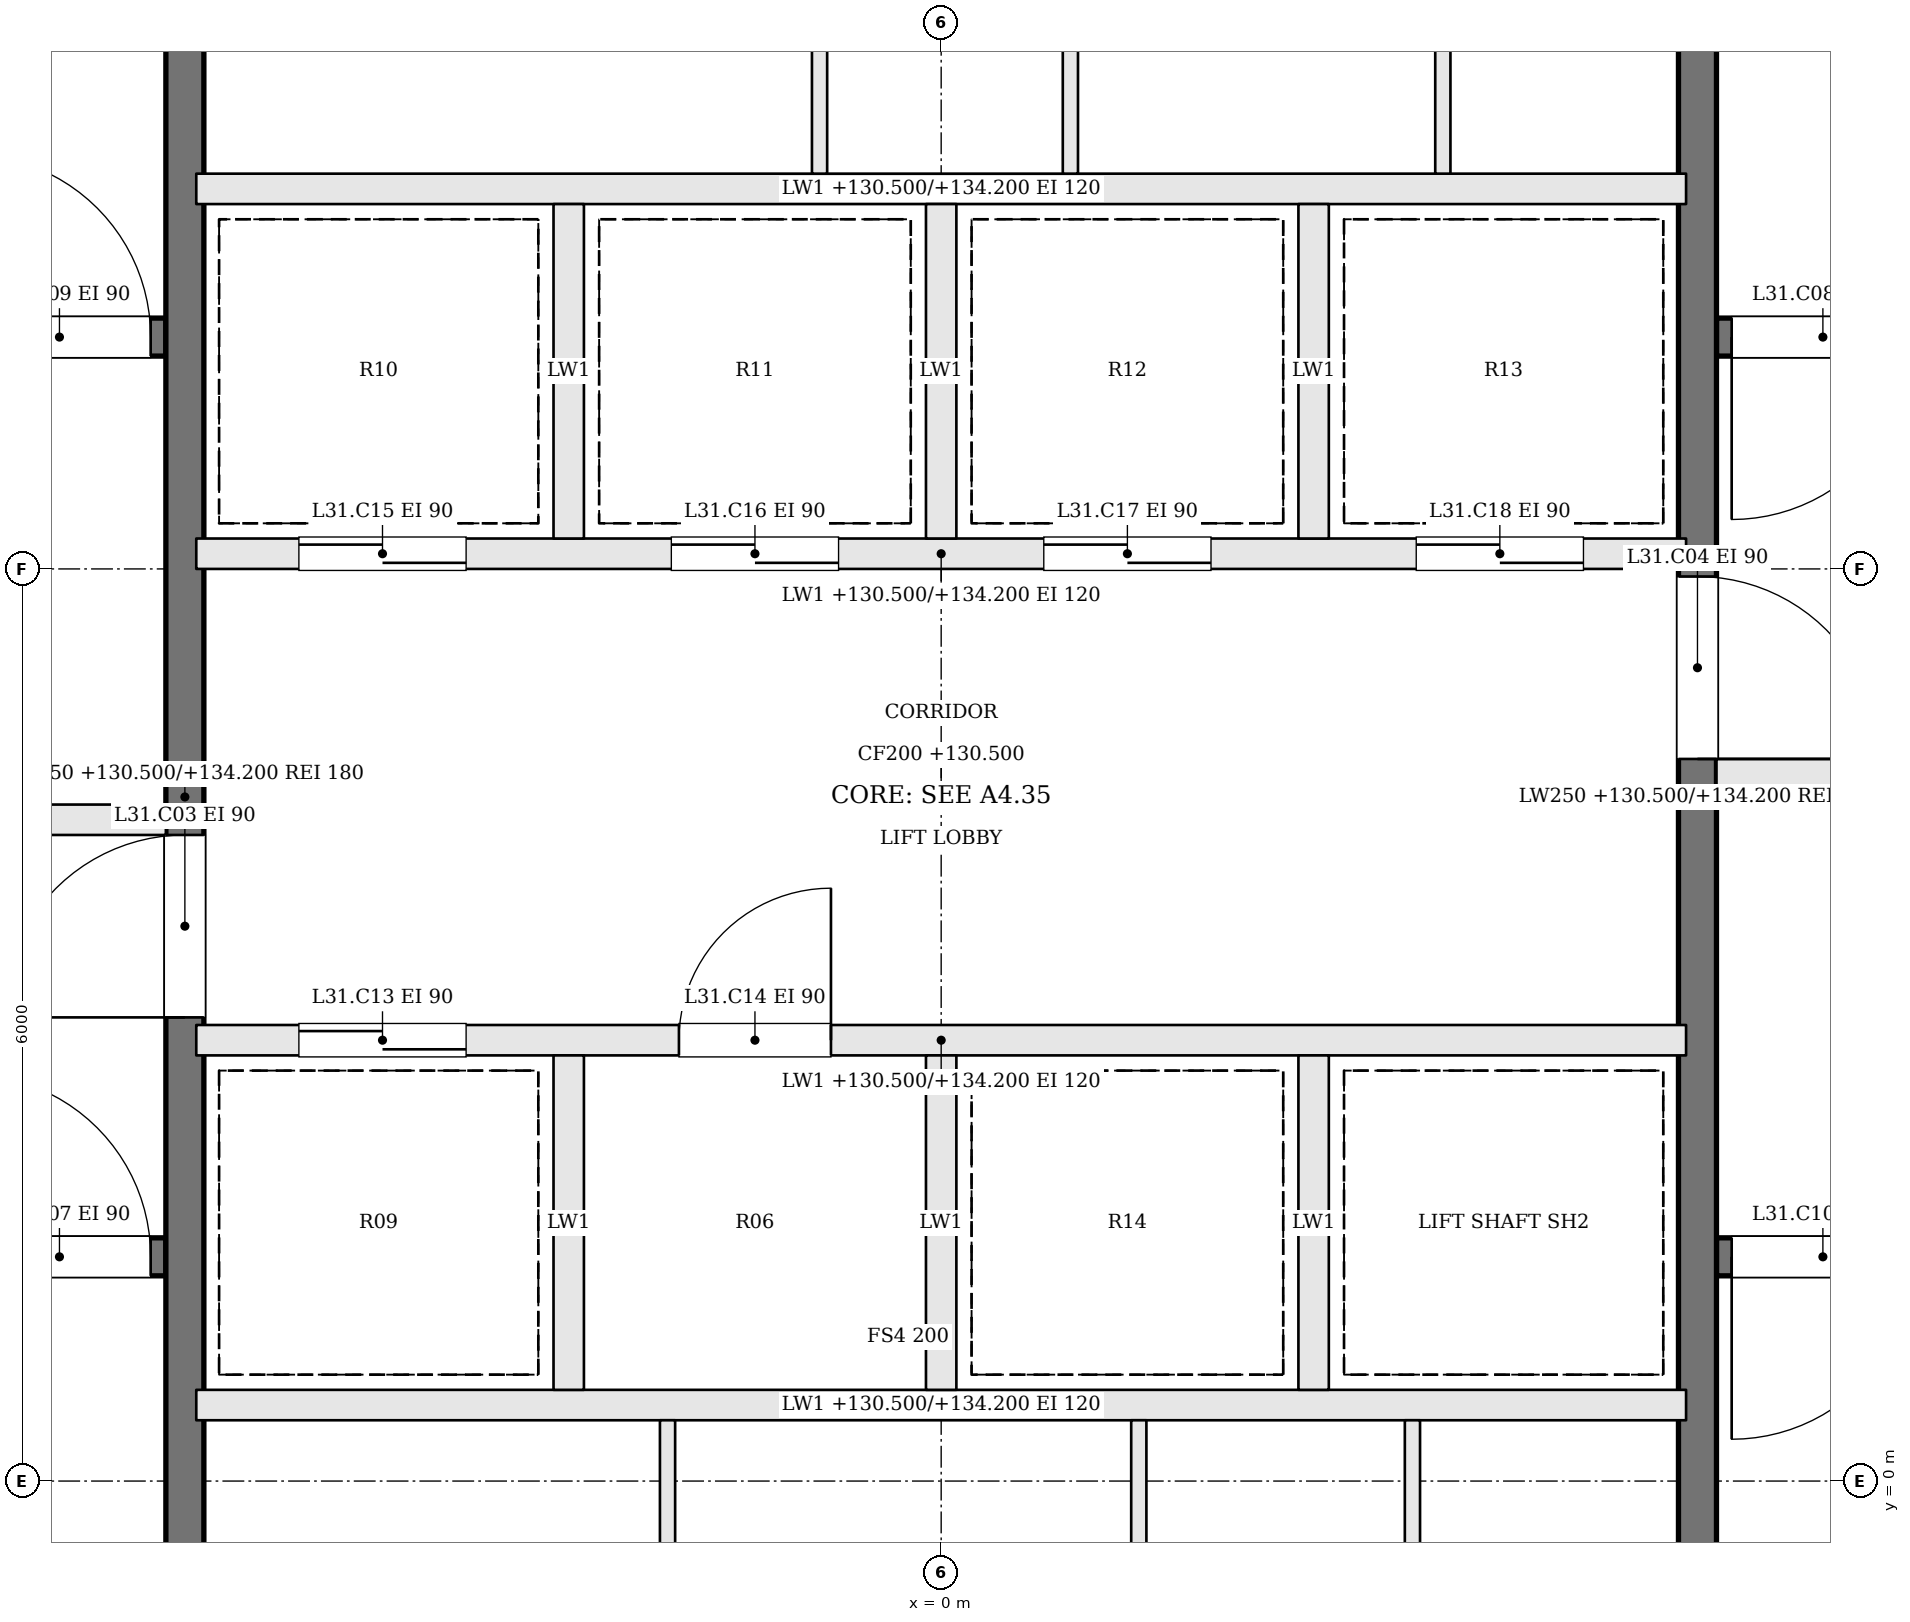
"""IFC4 building model, lengths in metres.
Left out: names, types, materials, properties, quantities, classifications, styles, units other than length and angle.
Written with IfcOpenShell. Run it as: python <this file> out.ifc"""

import sys

from ifc_helpers import new_model, si_unit, direction, frame, frame_2d, origin, place, context, subcontext, project, spatial, rectangle, extrude, element, fill, save


model = new_model("IFC4")
c1 = context("Model", 3, precision=1e-05, world=origin(), true_north=direction((0.0, 1.0)))
c2 = subcontext(c1, "Body", "Model", "MODEL_VIEW")
j1 = project(units=[si_unit("LENGTHUNIT", "METRE"), si_unit("PLANEANGLEUNIT", "RADIAN")], contexts=[c1])
p1 = place(None, origin())
s1 = spatial("IfcSite", under=j1, at=p1, CompositionType="ELEMENT")
p2 = place(p1, origin())
s2 = spatial("IfcBuilding", under=s1, at=p2, CompositionType="ELEMENT")
p3 = place(p2, frame((0.0, 0.0, 130.5)))
s3 = spatial("IfcBuildingStorey", under=s2, at=p3, CompositionType="ELEMENT", Elevation=130.5)
p4 = place(p3, frame((-11.9, 1.475, 0.0), z_axis=(0.0, 0.0, 1.0), x_axis=(1.0, 0.0, 0.0)))
e1 = element("IfcWall", 1, at=p4, inside=s3, PredefinedType="SOLIDWALL", context=c2, shape_type="SweptSolid", body=[
    extrude(rectangle(XDim=6.8, YDim=0.25, at=frame_2d((3.4, 0.0))), origin(), (0.0, 0.0, 1.0), 3.7),
])
p5 = place(p4, frame((5.5, 0.0, 0.0)))
e2 = element("IfcOpeningElement", 2, at=p5, cuts=e1, PredefinedType="OPENING", context=c2, shape_type="SweptSolid", body=[
    extrude(rectangle(XDim=1.2, YDim=2.1, at=frame_2d((0.6, 1.05))), frame((0.0, 0.135, 0.0), z_axis=(0.0, -1.0, 0.0), x_axis=(1.0, 0.0, 0.0)), (0.0, 0.0, 1.0), 0.27),
])
p6 = place(p3, frame((11.9, 7.525, 0.0), z_axis=(0.0, 0.0, 1.0), x_axis=(-1.0, 0.0, 0.0)))
e3 = element("IfcWall", 3, at=p6, inside=s3, PredefinedType="SOLIDWALL", context=c2, shape_type="SweptSolid", body=[
    extrude(rectangle(XDim=6.8, YDim=0.25, at=frame_2d((3.4, 0.0))), origin(), (0.0, 0.0, 1.0), 3.7),
])
p7 = place(p6, frame((5.5, 0.0, 0.0)))
e4 = element("IfcOpeningElement", 4, at=p7, cuts=e3, PredefinedType="OPENING", context=c2, shape_type="SweptSolid", body=[
    extrude(rectangle(XDim=1.2, YDim=2.1, at=frame_2d((0.6, 1.05))), frame((0.0, 0.135, 0.0), z_axis=(0.0, -1.0, 0.0), x_axis=(1.0, 0.0, 0.0)), (0.0, 0.0, 1.0), 0.27),
])
p8 = place(p3, frame((-11.9, 4.35, 0.0), z_axis=(0.0, 0.0, 1.0), x_axis=(1.0, 0.0, 0.0)))
e5 = element("IfcWall", 5, at=p8, inside=s3, PredefinedType="SOLIDWALL", context=c2, shape_type="SweptSolid", body=[
    extrude(rectangle(XDim=6.8, YDim=0.2, at=frame_2d((3.4, 0.0))), origin(), (0.0, 0.0, 1.0), 3.7),
])
p9 = place(p8, frame((4.1, 0.0, 0.0)))
e6 = element("IfcOpeningElement", 6, at=p9, cuts=e5, PredefinedType="OPENING", context=c2, shape_type="SweptSolid", body=[
    extrude(rectangle(XDim=1.2, YDim=2.1, at=frame_2d((0.6, 1.05))), frame((0.0, 0.11, 0.0), z_axis=(0.0, -1.0, 0.0), x_axis=(1.0, 0.0, 0.0)), (0.0, 0.0, 1.0), 0.22),
])
p10 = place(p8, frame((0.8, 0.0, 0.0)))
e7 = element("IfcOpeningElement", 7, at=p10, cuts=e5, PredefinedType="OPENING", context=c2, shape_type="SweptSolid", body=[
    extrude(rectangle(XDim=1.2, YDim=2.1, at=frame_2d((0.6, 1.05))), frame((0.0, 0.11, 0.0), z_axis=(0.0, -1.0, 0.0), x_axis=(1.0, 0.0, 0.0)), (0.0, 0.0, 1.0), 0.22),
])
p11 = place(p3, frame((11.9, 4.65, 0.0), z_axis=(0.0, 0.0, 1.0), x_axis=(-1.0, 0.0, 0.0)))
e8 = element("IfcWall", 8, at=p11, inside=s3, PredefinedType="SOLIDWALL", context=c2, shape_type="SweptSolid", body=[
    extrude(rectangle(XDim=6.8, YDim=0.2, at=frame_2d((3.4, 0.0))), origin(), (0.0, 0.0, 1.0), 3.7),
])
p12 = place(p11, frame((4.1, 0.0, 0.0)))
e9 = element("IfcOpeningElement", 9, at=p12, cuts=e8, PredefinedType="OPENING", context=c2, shape_type="SweptSolid", body=[
    extrude(rectangle(XDim=1.2, YDim=2.1, at=frame_2d((0.6, 1.05))), frame((0.0, 0.11, 0.0), z_axis=(0.0, -1.0, 0.0), x_axis=(1.0, 0.0, 0.0)), (0.0, 0.0, 1.0), 0.22),
])
p13 = place(p11, frame((0.8, 0.0, 0.0)))
e10 = element("IfcOpeningElement", 10, at=p13, cuts=e8, PredefinedType="OPENING", context=c2, shape_type="SweptSolid", body=[
    extrude(rectangle(XDim=1.2, YDim=2.1, at=frame_2d((0.6, 1.05))), frame((0.0, 0.11, 0.0), z_axis=(0.0, -1.0, 0.0), x_axis=(1.0, 0.0, 0.0)), (0.0, 0.0, 1.0), 0.22),
])
p14 = place(p3, frame((-11.9, 7.525, 0.0), z_axis=(0.0, 0.0, 1.0), x_axis=(1.0, 0.0, 0.0)))
e11 = element("IfcWall", 11, at=p14, inside=s3, PredefinedType="SOLIDWALL", context=c2, shape_type="SweptSolid", body=[
    extrude(rectangle(XDim=6.8, YDim=0.25, at=frame_2d((3.4, 0.0))), origin(), (0.0, 0.0, 1.0), 3.7),
])
p15 = place(p14, frame((5.5, 0.0, 0.0)))
e12 = element("IfcOpeningElement", 12, at=p15, cuts=e11, PredefinedType="OPENING", context=c2, shape_type="SweptSolid", body=[
    extrude(rectangle(XDim=1.2, YDim=2.1, at=frame_2d((0.6, 1.05))), frame((0.0, 0.135, 0.0), z_axis=(0.0, -1.0, 0.0), x_axis=(1.0, 0.0, 0.0)), (0.0, 0.0, 1.0), 0.27),
])
p16 = place(p3, frame((11.9, 1.475, 0.0), z_axis=(0.0, 0.0, 1.0), x_axis=(-1.0, 0.0, 0.0)))
e13 = element("IfcWall", 13, at=p16, inside=s3, PredefinedType="SOLIDWALL", context=c2, shape_type="SweptSolid", body=[
    extrude(rectangle(XDim=6.8, YDim=0.25, at=frame_2d((3.4, 0.0))), origin(), (0.0, 0.0, 1.0), 3.7),
])
p17 = place(p16, frame((5.5, 0.0, 0.0)))
e14 = element("IfcOpeningElement", 14, at=p17, cuts=e13, PredefinedType="OPENING", context=c2, shape_type="SweptSolid", body=[
    extrude(rectangle(XDim=1.2, YDim=2.1, at=frame_2d((0.6, 1.05))), frame((0.0, 0.135, 0.0), z_axis=(0.0, -1.0, 0.0), x_axis=(1.0, 0.0, 0.0)), (0.0, 0.0, 1.0), 0.27),
])
p18 = place(p3, frame((-4.975, -1.9, 0.0), z_axis=(0.0, 0.0, 1.0), x_axis=(0.0, 1.0, 0.0)))
e15 = element("IfcWall", 15, at=p18, inside=s3, PredefinedType="SOLIDWALL", context=c2, shape_type="SweptSolid", body=[
    extrude(rectangle(XDim=12.8, YDim=0.25, at=frame_2d((6.4, 0.0))), origin(), (0.0, 0.0, 1.0), 3.7),
])
p19 = place(p18, frame((4.95, 0.0, 0.0)))
e16 = element("IfcOpeningElement", 16, at=p19, cuts=e15, PredefinedType="OPENING", context=c2, shape_type="SweptSolid", body=[
    extrude(rectangle(XDim=1.2, YDim=2.1, at=frame_2d((0.6, 1.05))), frame((0.0, 0.135, 0.0), z_axis=(0.0, -1.0, 0.0), x_axis=(1.0, 0.0, 0.0)), (0.0, 0.0, 1.0), 0.27),
])
p20 = place(p3, frame((4.975, 10.9, 0.0), z_axis=(0.0, 0.0, 1.0), x_axis=(0.0, -1.0, 0.0)))
e17 = element("IfcWall", 17, at=p20, inside=s3, PredefinedType="SOLIDWALL", context=c2, shape_type="SweptSolid", body=[
    extrude(rectangle(XDim=12.8, YDim=0.25, at=frame_2d((6.4, 0.0))), origin(), (0.0, 0.0, 1.0), 3.7),
])
p21 = place(p20, frame((4.95, 0.0, 0.0)))
e18 = element("IfcOpeningElement", 18, at=p21, cuts=e17, PredefinedType="OPENING", context=c2, shape_type="SweptSolid", body=[
    extrude(rectangle(XDim=1.2, YDim=2.1, at=frame_2d((0.6, 1.05))), frame((0.0, 0.135, 0.0), z_axis=(0.0, -1.0, 0.0), x_axis=(1.0, 0.0, 0.0)), (0.0, 0.0, 1.0), 0.27),
])
p22 = place(p3, frame((-4.9, 0.5, 0.0), z_axis=(0.0, 0.0, 1.0), x_axis=(1.0, 0.0, 0.0)))
e19 = element("IfcWall", 19, at=p22, inside=s3, PredefinedType="SOLIDWALL", context=c2, shape_type="SweptSolid", body=[
    extrude(rectangle(XDim=9.8, YDim=0.2, at=frame_2d((4.9, 0.0))), origin(), (0.0, 0.0, 1.0), 3.7),
])
p23 = place(p3, frame((-4.9, 2.9, 0.0), z_axis=(0.0, 0.0, 1.0), x_axis=(1.0, 0.0, 0.0)))
e20 = element("IfcWall", 20, at=p23, inside=s3, PredefinedType="SOLIDWALL", context=c2, shape_type="SweptSolid", body=[
    extrude(rectangle(XDim=9.8, YDim=0.2, at=frame_2d((4.9, 0.0))), origin(), (0.0, 0.0, 1.0), 3.7),
])
p24 = place(p23, frame((0.675, 0.0, 0.0)))
e21 = element("IfcOpeningElement", 21, at=p24, cuts=e20, PredefinedType="OPENING", context=c2, shape_type="SweptSolid", body=[
    extrude(rectangle(XDim=1.1, YDim=2.1, at=frame_2d((0.55, 1.05))), frame((0.0, 0.11, 0.0), z_axis=(0.0, -1.0, 0.0), x_axis=(1.0, 0.0, 0.0)), (0.0, 0.0, 1.0), 0.22),
])
p25 = place(p23, frame((3.175, 0.0, 0.0)))
e22 = element("IfcOpeningElement", 22, at=p25, cuts=e20, PredefinedType="OPENING", context=c2, shape_type="SweptSolid", body=[
    extrude(rectangle(XDim=1.0, YDim=2.1, at=frame_2d((0.5, 1.05))), frame((0.0, 0.11, 0.0), z_axis=(0.0, -1.0, 0.0), x_axis=(1.0, 0.0, 0.0)), (0.0, 0.0, 1.0), 0.22),
])
p26 = place(p3, frame((-4.9, 6.1, 0.0), z_axis=(0.0, 0.0, 1.0), x_axis=(1.0, 0.0, 0.0)))
e23 = element("IfcWall", 23, at=p26, inside=s3, PredefinedType="SOLIDWALL", context=c2, shape_type="SweptSolid", body=[
    extrude(rectangle(XDim=9.8, YDim=0.2, at=frame_2d((4.9, 0.0))), origin(), (0.0, 0.0, 1.0), 3.7),
])
p27 = place(p26, frame((0.675, 0.0, 0.0)))
e24 = element("IfcOpeningElement", 24, at=p27, cuts=e23, PredefinedType="OPENING", context=c2, shape_type="SweptSolid", body=[
    extrude(rectangle(XDim=1.1, YDim=2.1, at=frame_2d((0.55, 1.05))), frame((0.0, 0.11, 0.0), z_axis=(0.0, -1.0, 0.0), x_axis=(1.0, 0.0, 0.0)), (0.0, 0.0, 1.0), 0.22),
])
p28 = place(p26, frame((3.125, 0.0, 0.0)))
e25 = element("IfcOpeningElement", 25, at=p28, cuts=e23, PredefinedType="OPENING", context=c2, shape_type="SweptSolid", body=[
    extrude(rectangle(XDim=1.1, YDim=2.1, at=frame_2d((0.55, 1.05))), frame((0.0, 0.11, 0.0), z_axis=(0.0, -1.0, 0.0), x_axis=(1.0, 0.0, 0.0)), (0.0, 0.0, 1.0), 0.22),
])
p29 = place(p26, frame((5.575, 0.0, 0.0)))
e26 = element("IfcOpeningElement", 26, at=p29, cuts=e23, PredefinedType="OPENING", context=c2, shape_type="SweptSolid", body=[
    extrude(rectangle(XDim=1.1, YDim=2.1, at=frame_2d((0.55, 1.05))), frame((0.0, 0.11, 0.0), z_axis=(0.0, -1.0, 0.0), x_axis=(1.0, 0.0, 0.0)), (0.0, 0.0, 1.0), 0.22),
])
p30 = place(p26, frame((8.025, 0.0, 0.0)))
e27 = element("IfcOpeningElement", 27, at=p30, cuts=e23, PredefinedType="OPENING", context=c2, shape_type="SweptSolid", body=[
    extrude(rectangle(XDim=1.1, YDim=2.1, at=frame_2d((0.55, 1.05))), frame((0.0, 0.11, 0.0), z_axis=(0.0, -1.0, 0.0), x_axis=(1.0, 0.0, 0.0)), (0.0, 0.0, 1.0), 0.22),
])
p31 = place(p3, frame((-4.9, 8.5, 0.0), z_axis=(0.0, 0.0, 1.0), x_axis=(1.0, 0.0, 0.0)))
e28 = element("IfcWall", 28, at=p31, inside=s3, PredefinedType="SOLIDWALL", context=c2, shape_type="SweptSolid", body=[
    extrude(rectangle(XDim=9.8, YDim=0.2, at=frame_2d((4.9, 0.0))), origin(), (0.0, 0.0, 1.0), 3.7),
])
for number, where, z_axis, x_axis in (
    (29, (-2.45, 0.6, 0.0), (0.0, 0.0, 1.0), (0.0, 1.0, 0.0)),
    (30, (0.0, 0.6, 0.0), (0.0, 0.0, 1.0), (0.0, 1.0, 0.0)),
    (31, (2.45, 0.6, 0.0), (0.0, 0.0, 1.0), (0.0, 1.0, 0.0)),
    (32, (-2.45, 6.2, 0.0), (0.0, 0.0, 1.0), (0.0, 1.0, 0.0)),
    (33, (0.0, 6.2, 0.0), (0.0, 0.0, 1.0), (0.0, 1.0, 0.0)),
    (34, (2.45, 6.2, 0.0), (0.0, 0.0, 1.0), (0.0, 1.0, 0.0)),
):
    element("IfcWall", number, at=place(p3, frame(where, z_axis=z_axis, x_axis=x_axis)), inside=s3, PredefinedType="SOLIDWALL", context=c2, shape_type="SweptSolid", body=[
        extrude(rectangle(XDim=2.2, YDim=0.2, at=frame_2d((1.1, 0.0))), origin(), (0.0, 0.0, 1.0), 3.7),
    ])
for number, where, z_axis, x_axis in (
    (35, (-1.8, -1.9, 0.0), (0.0, 0.0, 1.0), (0.0, 1.0, 0.0)),
    (36, (1.3, -1.9, 0.0), (0.0, 0.0, 1.0), (0.0, 1.0, 0.0)),
    (37, (3.1, -1.9, 0.0), (0.0, 0.0, 1.0), (0.0, 1.0, 0.0)),
    (38, (-0.8, 8.6, 0.0), (0.0, 0.0, 1.0), (0.0, 1.0, 0.0)),
    (39, (0.85, 8.6, 0.0), (0.0, 0.0, 1.0), (0.0, 1.0, 0.0)),
    (40, (3.3, 8.6, 0.0), (0.0, 0.0, 1.0), (0.0, 1.0, 0.0)),
):
    element("IfcWall", number, at=place(p3, frame(where, z_axis=z_axis, x_axis=x_axis)), inside=s3, PredefinedType="PARTITIONING", context=c2, shape_type="SweptSolid", body=[
        extrude(rectangle(XDim=2.3, YDim=0.1, at=frame_2d((1.15, 0.0))), origin(), (0.0, 0.0, 1.0), 3.7),
    ])
p32 = place(p19, origin())
e41 = element("IfcDoor", 41, at=p32, inside=s3, OperationType="SINGLE_SWING_LEFT", PredefinedType="DOOR", context=c2, shape_type="SweptSolid", body=[
    extrude(rectangle(XDim=1.2, YDim=2.1, at=frame_2d((0.6, 1.05))), frame((0.0, 0.025, 0.0), z_axis=(0.0, -1.0, 0.0), x_axis=(1.0, 0.0, 0.0)), (0.0, 0.0, 1.0), 0.05),
])
fill(e16, e41)
p33 = place(p21, origin())
e42 = element("IfcDoor", 42, at=p33, inside=s3, OperationType="SINGLE_SWING_RIGHT", PredefinedType="DOOR", context=c2, shape_type="SweptSolid", body=[
    extrude(rectangle(XDim=1.2, YDim=2.1, at=frame_2d((0.6, 1.05))), frame((0.0, 0.025, 0.0), z_axis=(0.0, -1.0, 0.0), x_axis=(1.0, 0.0, 0.0)), (0.0, 0.0, 1.0), 0.05),
])
fill(e18, e42)
p34 = place(p5, origin())
e43 = element("IfcDoor", 43, at=p34, inside=s3, OperationType="SINGLE_SWING_LEFT", PredefinedType="DOOR", context=c2, shape_type="SweptSolid", body=[
    extrude(rectangle(XDim=1.2, YDim=2.1, at=frame_2d((0.6, 1.05))), frame((0.0, 0.025, 0.0), z_axis=(0.0, -1.0, 0.0), x_axis=(1.0, 0.0, 0.0)), (0.0, 0.0, 1.0), 0.05),
])
fill(e2, e43)
p35 = place(p7, origin())
e44 = element("IfcDoor", 44, at=p35, inside=s3, OperationType="SINGLE_SWING_RIGHT", PredefinedType="DOOR", context=c2, shape_type="SweptSolid", body=[
    extrude(rectangle(XDim=1.2, YDim=2.1, at=frame_2d((0.6, 1.05))), frame((0.0, 0.025, 0.0), z_axis=(0.0, -1.0, 0.0), x_axis=(1.0, 0.0, 0.0)), (0.0, 0.0, 1.0), 0.05),
])
fill(e4, e44)
p36 = place(p15, origin())
e45 = element("IfcDoor", 45, at=p36, inside=s3, OperationType="SINGLE_SWING_LEFT", PredefinedType="DOOR", context=c2, shape_type="SweptSolid", body=[
    extrude(rectangle(XDim=1.2, YDim=2.1, at=frame_2d((0.6, 1.05))), frame((0.0, 0.025, 0.0), z_axis=(0.0, -1.0, 0.0), x_axis=(1.0, 0.0, 0.0)), (0.0, 0.0, 1.0), 0.05),
])
fill(e12, e45)
p37 = place(p17, origin())
e46 = element("IfcDoor", 46, at=p37, inside=s3, OperationType="SINGLE_SWING_RIGHT", PredefinedType="DOOR", context=c2, shape_type="SweptSolid", body=[
    extrude(rectangle(XDim=1.2, YDim=2.1, at=frame_2d((0.6, 1.05))), frame((0.0, 0.025, 0.0), z_axis=(0.0, -1.0, 0.0), x_axis=(1.0, 0.0, 0.0)), (0.0, 0.0, 1.0), 0.05),
])
fill(e14, e46)
p38 = place(p24, origin())
e47 = element("IfcDoor", 47, at=p38, inside=s3, OperationType="SLIDING_TO_RIGHT", PredefinedType="DOOR", context=c2, shape_type="SweptSolid", body=[
    extrude(rectangle(XDim=1.1, YDim=2.1, at=frame_2d((0.55, 1.05))), frame((0.0, 0.025, 0.0), z_axis=(0.0, -1.0, 0.0), x_axis=(1.0, 0.0, 0.0)), (0.0, 0.0, 1.0), 0.05),
])
fill(e21, e47)
p39 = place(p25, origin())
e48 = element("IfcDoor", 48, at=p39, inside=s3, OperationType="SINGLE_SWING_RIGHT", PredefinedType="DOOR", context=c2, shape_type="SweptSolid", body=[
    extrude(rectangle(XDim=1.0, YDim=2.1, at=frame_2d((0.5, 1.05))), frame((0.0, 0.025, 0.0), z_axis=(0.0, -1.0, 0.0), x_axis=(1.0, 0.0, 0.0)), (0.0, 0.0, 1.0), 0.05),
])
fill(e22, e48)
p40 = place(p27, origin())
e49 = element("IfcDoor", 49, at=p40, inside=s3, OperationType="SLIDING_TO_RIGHT", PredefinedType="DOOR", context=c2, shape_type="SweptSolid", body=[
    extrude(rectangle(XDim=1.1, YDim=2.1, at=frame_2d((0.55, 1.05))), frame((0.0, 0.025, 0.0), z_axis=(0.0, -1.0, 0.0), x_axis=(1.0, 0.0, 0.0)), (0.0, 0.0, 1.0), 0.05),
])
fill(e24, e49)
p41 = place(p28, origin())
e50 = element("IfcDoor", 50, at=p41, inside=s3, OperationType="SLIDING_TO_LEFT", PredefinedType="DOOR", context=c2, shape_type="SweptSolid", body=[
    extrude(rectangle(XDim=1.1, YDim=2.1, at=frame_2d((0.55, 1.05))), frame((0.0, 0.025, 0.0), z_axis=(0.0, -1.0, 0.0), x_axis=(1.0, 0.0, 0.0)), (0.0, 0.0, 1.0), 0.05),
])
fill(e25, e50)
p42 = place(p29, origin())
e51 = element("IfcDoor", 51, at=p42, inside=s3, OperationType="SLIDING_TO_RIGHT", PredefinedType="DOOR", context=c2, shape_type="SweptSolid", body=[
    extrude(rectangle(XDim=1.1, YDim=2.1, at=frame_2d((0.55, 1.05))), frame((0.0, 0.025, 0.0), z_axis=(0.0, -1.0, 0.0), x_axis=(1.0, 0.0, 0.0)), (0.0, 0.0, 1.0), 0.05),
])
fill(e26, e51)
p43 = place(p30, origin())
e52 = element("IfcDoor", 52, at=p43, inside=s3, OperationType="SLIDING_TO_LEFT", PredefinedType="DOOR", context=c2, shape_type="SweptSolid", body=[
    extrude(rectangle(XDim=1.1, YDim=2.1, at=frame_2d((0.55, 1.05))), frame((0.0, 0.025, 0.0), z_axis=(0.0, -1.0, 0.0), x_axis=(1.0, 0.0, 0.0)), (0.0, 0.0, 1.0), 0.05),
])
fill(e27, e52)
save(model, sys.argv[1])
